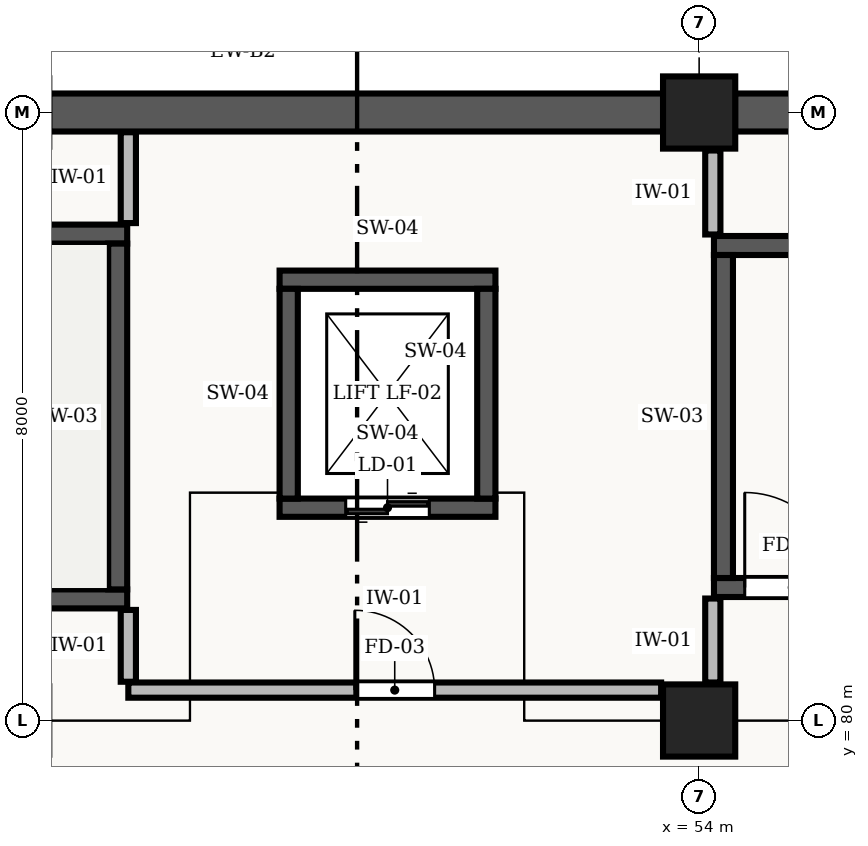
"""IFC4 building model, lengths in metres.
Left out: names, types, materials, properties, quantities, classifications, styles, units other than length and angle.
Written with IfcOpenShell. Run it as: python <this file> out.ifc"""

import sys

from ifc_helpers import new_model, si_unit, direction, frame, frame_2d, origin, origin_2d, place, context, subcontext, project, spatial, rectangle, extrude, element, fill, save


model = new_model("IFC4")
c1 = context("Model", 3, precision=1e-05, world=origin(), true_north=direction((0.0, 1.0)))
c2 = subcontext(c1, "Body", "Model", "MODEL_VIEW")
j1 = project(units=[si_unit("LENGTHUNIT", "METRE"), si_unit("PLANEANGLEUNIT", "RADIAN")], contexts=[c1])
p1 = place(None, origin())
s1 = spatial("IfcSite", under=j1, at=p1, CompositionType="ELEMENT")
p2 = place(p1, origin())
s2 = spatial("IfcBuilding", under=s1, at=p2, CompositionType="ELEMENT")
p3 = place(p2, frame((0.0, 0.0, -6.0)))
s3 = spatial("IfcBuildingStorey", under=s2, at=p3, CompositionType="ELEMENT", Elevation=-6.0)
for number, where, z_axis, x_axis in (
    (1, (54.0, 80.0, 0.0), (0.0, 0.0, 1.0), (1.0, 0.0, 0.0)),
    (2, (54.0, 88.0, 0.0), (0.0, 0.0, 1.0), (1.0, 0.0, 0.0)),
):
    element("IfcColumn", number, at=place(p3, frame(where, z_axis=z_axis, x_axis=x_axis)), inside=s3, PredefinedType="COLUMN", context=c2, shape_type="SweptSolid", body=[
        extrude(rectangle(XDim=0.95, YDim=0.95, at=origin_2d()), origin(), (0.0, 0.0, 1.0), 6.0),
    ])
for number, where, z_axis, x_axis in (
    (3, (45.448, 88.0, 0.0), (0.0, 0.0, 1.0), (1.0, 0.0, 0.0)),
    (4, (54.473, 88.0, 0.0), (0.0, 0.0, 1.0), (1.0, 0.0, 0.0)),
):
    element("IfcWall", number, at=place(p3, frame(where, z_axis=z_axis, x_axis=x_axis)), inside=s3, PredefinedType="STANDARD", context=c2, shape_type="SweptSolid", body=[
        extrude(rectangle(XDim=8.079, YDim=0.5, at=frame_2d((4.04, 0.0))), origin(), (0.0, 0.0, 1.0), 5.56),
    ])
p4 = place(p3, frame((36.975, 81.6, 0.0), z_axis=(0.0, 0.0, 1.0), x_axis=(1.0, 0.0, 0.0)))
e5 = element("IfcWall", 5, at=p4, inside=s3, PredefinedType="SHEAR", context=c2, shape_type="SweptSolid", body=[
    extrude(rectangle(XDim=9.5, YDim=0.25, at=frame_2d((4.75, 0.0))), origin(), (0.0, 0.0, 1.0), 5.55),
])
p5 = place(p4, frame((0.445, 0.0, 0.0)))
e6 = element("IfcOpeningElement", 6, at=p5, cuts=e5, PredefinedType="OPENING", context=c2, shape_type="SweptSolid", body=[
    extrude(rectangle(XDim=1.25, YDim=2.15, at=frame_2d((0.625, 1.075))), frame((0.0, 0.137, 0.0), z_axis=(0.0, -1.0, 0.0), x_axis=(1.0, 0.0, 0.0)), (0.0, 0.0, 1.0), 0.274),
])
p6 = place(p3, frame((46.475, 86.4, 0.0), z_axis=(0.0, 0.0, 1.0), x_axis=(-1.0, 0.0, 0.0)))
e7 = element("IfcWall", 7, at=p6, inside=s3, PredefinedType="SHEAR", context=c2, shape_type="SweptSolid", body=[
    extrude(rectangle(XDim=9.5, YDim=0.25, at=frame_2d((4.75, 0.0))), origin(), (0.0, 0.0, 1.0), 5.55),
])
p7 = place(p3, frame((46.35, 81.725, 0.0), z_axis=(0.0, 0.0, 1.0), x_axis=(0.0, 1.0, 0.0)))
e8 = element("IfcWall", 8, at=p7, inside=s3, PredefinedType="SHEAR", context=c2, shape_type="SweptSolid", body=[
    extrude(rectangle(XDim=4.55, YDim=0.25, at=frame_2d((2.275, 0.0))), origin(), (0.0, 0.0, 1.0), 5.55),
])
p8 = place(p3, frame((54.195, 81.75, 0.0), z_axis=(0.0, 0.0, 1.0), x_axis=(1.0, 0.0, 0.0)))
e9 = element("IfcWall", 9, at=p8, inside=s3, PredefinedType="SHEAR", context=c2, shape_type="SweptSolid", body=[
    extrude(rectangle(XDim=8.49, YDim=0.25, at=frame_2d((4.245, 0.0))), origin(), (0.0, 0.0, 1.0), 5.55),
])
p9 = place(p8, frame((0.405, 0.0, 0.0)))
e10 = element("IfcOpeningElement", 10, at=p9, cuts=e9, PredefinedType="OPENING", context=c2, shape_type="SweptSolid", body=[
    extrude(rectangle(XDim=1.25, YDim=2.15, at=frame_2d((0.625, 1.075))), frame((0.0, 0.137, 0.0), z_axis=(0.0, -1.0, 0.0), x_axis=(1.0, 0.0, 0.0)), (0.0, 0.0, 1.0), 0.274),
])
p10 = place(p3, frame((62.685, 86.25, 0.0), z_axis=(0.0, 0.0, 1.0), x_axis=(-1.0, 0.0, 0.0)))
e11 = element("IfcWall", 11, at=p10, inside=s3, PredefinedType="SHEAR", context=c2, shape_type="SweptSolid", body=[
    extrude(rectangle(XDim=8.49, YDim=0.25, at=frame_2d((4.245, 0.0))), origin(), (0.0, 0.0, 1.0), 5.55),
])
p11 = place(p3, frame((54.32, 86.125, 0.0), z_axis=(0.0, 0.0, 1.0), x_axis=(0.0, -1.0, 0.0)))
e12 = element("IfcWall", 12, at=p11, inside=s3, PredefinedType="SHEAR", context=c2, shape_type="SweptSolid", body=[
    extrude(rectangle(XDim=4.25, YDim=0.25, at=frame_2d((2.125, 0.0))), origin(), (0.0, 0.0, 1.0), 5.55),
])
p12 = place(p3, frame((48.48, 82.8, 0.0), z_axis=(0.0, 0.0, 1.0), x_axis=(1.0, 0.0, 0.0)))
e13 = element("IfcWall", 13, at=p12, inside=s3, PredefinedType="SHEAR", context=c2, shape_type="SweptSolid", body=[
    extrude(rectangle(XDim=2.84, YDim=0.24, at=frame_2d((1.42, 0.0))), origin(), (0.0, 0.0, 1.0), 5.55),
])
p13 = place(p12, frame((0.87, 0.0, 0.0)))
e14 = element("IfcOpeningElement", 14, at=p13, cuts=e13, PredefinedType="OPENING", context=c2, shape_type="SweptSolid", body=[
    extrude(rectangle(XDim=1.1, YDim=2.2, at=frame_2d((0.55, 1.1))), frame((0.0, 0.132, 0.0), z_axis=(0.0, -1.0, 0.0), x_axis=(1.0, 0.0, 0.0)), (0.0, 0.0, 1.0), 0.264),
])
p14 = place(p3, frame((51.32, 85.8, 0.0), z_axis=(0.0, 0.0, 1.0), x_axis=(-1.0, 0.0, 0.0)))
e15 = element("IfcWall", 15, at=p14, inside=s3, PredefinedType="SHEAR", context=c2, shape_type="SweptSolid", body=[
    extrude(rectangle(XDim=2.84, YDim=0.24, at=frame_2d((1.42, 0.0))), origin(), (0.0, 0.0, 1.0), 5.55),
])
for number, where, z_axis, x_axis in (
    (16, (48.6, 85.68, 0.0), (0.0, 0.0, 1.0), (0.0, -1.0, 0.0)),
    (17, (51.2, 82.92, 0.0), (0.0, 0.0, 1.0), (0.0, 1.0, 0.0)),
):
    element("IfcWall", number, at=place(p3, frame(where, z_axis=z_axis, x_axis=x_axis)), inside=s3, PredefinedType="SHEAR", context=c2, shape_type="SweptSolid", body=[
        extrude(rectangle(XDim=2.76, YDim=0.24, at=frame_2d((1.38, 0.0))), origin(), (0.0, 0.0, 1.0), 5.55),
    ])
p15 = place(p3, frame((46.49, 80.4, 0.0), z_axis=(0.0, 0.0, 1.0), x_axis=(1.0, 0.0, 0.0)))
e18 = element("IfcWall", 18, at=p15, inside=s3, PredefinedType="STANDARD", context=c2, shape_type="SweptSolid", body=[
    extrude(rectangle(XDim=7.01, YDim=0.2, at=frame_2d((3.505, 0.0))), origin(), (0.0, 0.0, 1.0), 4.38),
])
p16 = place(p15, frame((2.98, 0.0, 0.0)))
e19 = element("IfcOpeningElement", 19, at=p16, cuts=e18, PredefinedType="OPENING", context=c2, shape_type="SweptSolid", body=[
    extrude(rectangle(XDim=1.05, YDim=2.15, at=frame_2d((0.525, 1.075))), frame((0.0, 0.112, 0.0), z_axis=(0.0, -1.0, 0.0), x_axis=(1.0, 0.0, 0.0)), (0.0, 0.0, 1.0), 0.224),
])
p17 = place(p3, frame((46.49, 80.51, 0.0), z_axis=(0.0, 0.0, 1.0), x_axis=(0.0, 1.0, 0.0)))
e20 = element("IfcWall", 20, at=p17, inside=s3, PredefinedType="STANDARD", context=c2, shape_type="SweptSolid", body=[
    extrude(rectangle(XDim=0.945, YDim=0.2, at=frame_2d((0.473, 0.0))), origin(), (0.0, 0.0, 1.0), 5.55),
])
p18 = place(p3, frame((46.49, 86.545, 0.0), z_axis=(0.0, 0.0, 1.0), x_axis=(0.0, 1.0, 0.0)))
e21 = element("IfcWall", 21, at=p18, inside=s3, PredefinedType="STANDARD", context=c2, shape_type="SweptSolid", body=[
    extrude(rectangle(XDim=1.195, YDim=0.2, at=frame_2d((0.598, 0.0))), origin(), (0.0, 0.0, 1.0), 5.55),
])
for number, where, z_axis, x_axis in (
    (22, (54.18, 80.5, 0.0), (0.0, 0.0, 1.0), (0.0, 1.0, 0.0)),
    (23, (54.18, 86.395, 0.0), (0.0, 0.0, 1.0), (0.0, 1.0, 0.0)),
):
    element("IfcWall", number, at=place(p3, frame(where, z_axis=z_axis, x_axis=x_axis)), inside=s3, PredefinedType="STANDARD", context=c2, shape_type="SweptSolid", body=[
        extrude(rectangle(XDim=1.105, YDim=0.2, at=frame_2d((0.552, 0.0))), origin(), (0.0, 0.0, 1.0), 4.58),
    ])
p19 = place(p9, origin())
e24 = element("IfcDoor", 24, at=p19, inside=s3, OperationType="SINGLE_SWING_LEFT", PredefinedType="DOOR", context=c2, shape_type="SweptSolid", body=[
    extrude(rectangle(XDim=1.25, YDim=2.15, at=frame_2d((0.625, 1.075))), frame((0.0, 0.025, 0.0), z_axis=(0.0, -1.0, 0.0), x_axis=(1.0, 0.0, 0.0)), (0.0, 0.0, 1.0), 0.05),
])
fill(e10, e24)
p20 = place(p13, origin())
e25 = element("IfcDoor", 25, at=p20, inside=s3, OperationType="DOUBLE_DOOR_SLIDING", PredefinedType="DOOR", context=c2, shape_type="SweptSolid", body=[
    extrude(rectangle(XDim=1.1, YDim=2.2, at=frame_2d((0.55, 1.1))), frame((0.0, 0.025, 0.0), z_axis=(0.0, -1.0, 0.0), x_axis=(1.0, 0.0, 0.0)), (0.0, 0.0, 1.0), 0.05),
])
fill(e14, e25)
p21 = place(p16, origin())
e26 = element("IfcDoor", 26, at=p21, inside=s3, OperationType="SINGLE_SWING_LEFT", PredefinedType="DOOR", context=c2, shape_type="SweptSolid", body=[
    extrude(rectangle(XDim=1.05, YDim=2.15, at=frame_2d((0.525, 1.075))), frame((0.0, 0.025, 0.0), z_axis=(0.0, -1.0, 0.0), x_axis=(1.0, 0.0, 0.0)), (0.0, 0.0, 1.0), 0.05),
])
fill(e19, e26)
save(model, sys.argv[1])
